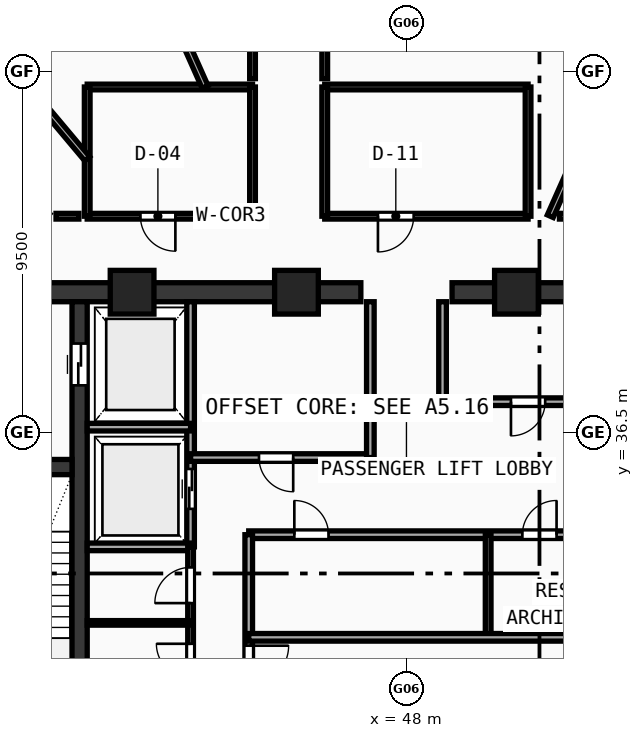
"""IFC4 building model, lengths in metres.
Left out: names, types, materials, properties, quantities, classifications, styles, units other than length and angle.
Written with IfcOpenShell. Run it as: python <this file> out.ifc"""

import sys

from ifc_helpers import new_model, si_unit, direction, frame, frame_2d, origin, origin_with_axes, origin_2d, place, context, subcontext, project, spatial, rectangle, hollow_rectangle, extrude, source, transform, mapped, element, fill, save


model = new_model("IFC4")
c1 = context("Model", 3, precision=1e-05, world=origin(), true_north=direction((0.0, 1.0)))
c2 = subcontext(c1, "Body", "Model", "MODEL_VIEW")
j1 = project(units=[si_unit("LENGTHUNIT", "METRE"), si_unit("PLANEANGLEUNIT", "RADIAN")], contexts=[c1])
p1 = place(None, origin())
s1 = spatial("IfcSite", under=j1, at=p1, CompositionType="ELEMENT")
p2 = place(p1, origin())
s2 = spatial("IfcBuilding", under=s1, at=p2, CompositionType="ELEMENT")
p3 = place(p2, frame((0.0, 0.0, 233.34)))
s3 = spatial("IfcBuildingStorey", under=s2, at=p3, CompositionType="ELEMENT", Elevation=233.34)
p4 = place(p3, frame((35.55, 40.2, 0.0), z_axis=(0.0, 0.0, 1.0), x_axis=(1.0, 0.0, 0.0)))
e1 = element("IfcWall", 1, at=p4, inside=s3, PredefinedType="SHEAR", context=c2, shape_type="SweptSolid", body=[
    extrude(rectangle(XDim=11.25, YDim=0.5, at=frame_2d((5.625, 0.0))), origin(), (0.0, 0.0, 1.0), 3.47),
])
p5 = place(p4, frame((1.6, 0.0, 0.0)))
e2 = element("IfcOpeningElement", 2, at=p5, cuts=e1, PredefinedType="OPENING", context=c2, shape_type="SweptSolid", body=[
    extrude(rectangle(XDim=1.05, YDim=2.1, at=frame_2d((0.525, 1.05))), frame((0.0, 0.26, 0.0), z_axis=(0.0, -1.0, 0.0), x_axis=(1.0, 0.0, 0.0)), (0.0, 0.0, 1.0), 0.52),
])
p6 = place(p3, frame((49.2, 40.2, 0.0), z_axis=(0.0, 0.0, 1.0), x_axis=(1.0, 0.0, 0.0)))
e3 = element("IfcWall", 3, at=p6, inside=s3, PredefinedType="SHEAR", context=c2, shape_type="SweptSolid", body=[
    extrude(rectangle(XDim=11.25, YDim=0.5, at=frame_2d((5.625, 0.0))), origin(), (0.0, 0.0, 1.0), 3.47),
])
p7 = place(p6, frame((8.6, 0.0, 0.0)))
e4 = element("IfcOpeningElement", 4, at=p7, cuts=e3, PredefinedType="OPENING", context=c2, shape_type="SweptSolid", body=[
    extrude(rectangle(XDim=1.05, YDim=2.1, at=frame_2d((0.525, 1.05))), frame((0.0, 0.26, 0.0), z_axis=(0.0, -1.0, 0.0), x_axis=(1.0, 0.0, 0.0)), (0.0, 0.0, 1.0), 0.52),
])
p8 = place(p3, frame((39.4, 27.75, 0.0), z_axis=(0.0, 0.0, 1.0), x_axis=(0.0, 1.0, 0.0)))
e5 = element("IfcWall", 5, at=p8, inside=s3, PredefinedType="SHEAR", context=c2, shape_type="SweptSolid", body=[
    extrude(rectangle(XDim=12.2, YDim=0.4, at=frame_2d((6.1, 0.0))), origin(), (0.0, 0.0, 1.0), 3.47),
])
p9 = place(p8, frame((10.0, 0.0, 0.0)))
e6 = element("IfcOpeningElement", 6, at=p9, cuts=e5, PredefinedType="OPENING", context=c2, shape_type="SweptSolid", body=[
    extrude(rectangle(XDim=1.1, YDim=2.1, at=frame_2d((0.55, 1.05))), frame((0.0, 0.21, 0.0), z_axis=(0.0, -1.0, 0.0), x_axis=(1.0, 0.0, 0.0)), (0.0, 0.0, 1.0), 0.42),
])
p10 = place(p3, frame((36.05, 35.6, 0.0), z_axis=(0.0, 0.0, 1.0), x_axis=(1.0, 0.0, 0.0)))
e7 = element("IfcWall", 7, at=p10, inside=s3, PredefinedType="SHEAR", context=c2, shape_type="SweptSolid", body=[
    extrude(rectangle(XDim=3.15, YDim=0.4, at=frame_2d((1.575, 0.0))), origin(), (0.0, 0.0, 1.0), 3.47),
])
p11 = place(p10, frame((1.07, 0.0, 0.0)))
e8 = element("IfcOpeningElement", 8, at=p11, cuts=e7, PredefinedType="OPENING", context=c2, shape_type="SweptSolid", body=[
    extrude(rectangle(XDim=1.05, YDim=2.1, at=frame_2d((0.525, 1.05))), frame((0.0, 0.21, 0.0), z_axis=(0.0, -1.0, 0.0), x_axis=(1.0, 0.0, 0.0)), (0.0, 0.0, 1.0), 0.42),
])
m1 = source(origin(), c2, "Body", "SweptSolid", [
    extrude(hollow_rectangle(XDim=1.15, YDim=1.15, WallThickness=0.048, at=origin_2d()), origin(), (0.0, 0.0, 1.0), 3.73),
])
for number, where, z_axis, x_axis in (
    (9, (50.894, 40.2, -0.26), (0.0, 0.0, 1.0), (1.0, 0.0, 0.0)),
    (10, (45.106, 40.2, -0.26), (0.0, 0.0, 1.0), (1.0, 0.0, 0.0)),
    (11, (40.781, 40.2, -0.26), (0.0, 0.0, 1.0), (1.0, 0.0, 0.0)),
):
    element("IfcColumn", number, at=place(p3, frame(where, z_axis=z_axis, x_axis=x_axis)), inside=s3, PredefinedType="COLUMN", context=c2, shape_type="MappedRepresentation", body=[
        mapped(m1, transform((0.0, 0.0, 0.0), scale=1.0)),
    ])
p12 = place(p3, frame((42.32, 33.5, 0.0), z_axis=(0.0, 0.0, 1.0), x_axis=(0.0, 1.0, 0.0)))
e12 = element("IfcWall", 12, at=p12, inside=s3, PredefinedType="SOLIDWALL", context=c2, shape_type="SweptSolid", body=[
    extrude(rectangle(XDim=6.45, YDim=0.2, at=frame_2d((3.225, 0.0))), origin(), (0.0, 0.0, 1.0), 3.47),
])
p13 = place(p12, frame((1.0, 0.0, 0.0)))
e13 = element("IfcOpeningElement", 13, at=p13, cuts=e12, PredefinedType="OPENING", context=c2, shape_type="SweptSolid", body=[
    extrude(rectangle(XDim=1.05, YDim=2.1, at=frame_2d((0.525, 1.05))), frame((0.0, 0.11, 0.0), z_axis=(0.0, -1.0, 0.0), x_axis=(1.0, 0.0, 0.0)), (0.0, 0.0, 1.0), 0.22),
])
for number, where, z_axis, x_axis in (
    (14, (39.6, 36.65, 0.0), (0.0, 0.0, 1.0), (1.0, 0.0, 0.0)),
    (15, (39.6, 33.5, 0.0), (0.0, 0.0, 1.0), (1.0, 0.0, 0.0)),
):
    element("IfcWall", number, at=place(p3, frame(where, z_axis=z_axis, x_axis=x_axis)), inside=s3, PredefinedType="SOLIDWALL", context=c2, shape_type="SweptSolid", body=[
        extrude(rectangle(XDim=2.72, YDim=0.2, at=frame_2d((1.36, 0.0))), origin(), (0.0, 0.0, 1.0), 3.47),
    ])
p14 = place(p3, frame((42.32, 35.85, 0.0), z_axis=(0.0, 0.0, 1.0), x_axis=(1.0, 0.0, 0.0)))
e16 = element("IfcWall", 16, at=p14, inside=s3, PredefinedType="SOLIDWALL", context=c2, shape_type="SweptSolid", body=[
    extrude(rectangle(XDim=4.73, YDim=0.2, at=frame_2d((2.365, 0.0))), origin(), (0.0, 0.0, 1.0), 3.47),
])
p15 = place(p14, frame((1.8, 0.0, 0.0)))
e17 = element("IfcOpeningElement", 17, at=p15, cuts=e16, PredefinedType="OPENING", context=c2, shape_type="SweptSolid", body=[
    extrude(rectangle(XDim=0.9, YDim=2.1, at=frame_2d((0.45, 1.05))), frame((0.0, 0.11, 0.0), z_axis=(0.0, -1.0, 0.0), x_axis=(1.0, 0.0, 0.0)), (0.0, 0.0, 1.0), 0.22),
])
p16 = place(p3, frame((48.95, 37.32, 0.0), z_axis=(0.0, 0.0, 1.0), x_axis=(1.0, 0.0, 0.0)))
e18 = element("IfcWall", 18, at=p16, inside=s3, PredefinedType="SOLIDWALL", context=c2, shape_type="SweptSolid", body=[
    extrude(rectangle(XDim=4.73, YDim=0.2, at=frame_2d((2.365, 0.0))), origin(), (0.0, 0.0, 1.0), 3.47),
])
p17 = place(p16, frame((1.8, 0.0, 0.0)))
e19 = element("IfcOpeningElement", 19, at=p17, cuts=e18, PredefinedType="OPENING", context=c2, shape_type="SweptSolid", body=[
    extrude(rectangle(XDim=0.9, YDim=2.1, at=frame_2d((0.45, 1.05))), frame((0.0, 0.11, 0.0), z_axis=(0.0, -1.0, 0.0), x_axis=(1.0, 0.0, 0.0)), (0.0, 0.0, 1.0), 0.22),
])
p18 = place(p3, frame((47.05, 35.85, 0.0), z_axis=(0.0, 0.0, 1.0), x_axis=(0.0, 1.0, 0.0)))
e20 = element("IfcWall", 20, at=p18, inside=s3, PredefinedType="SOLIDWALL", context=c2, shape_type="SweptSolid", body=[
    extrude(rectangle(XDim=4.1, YDim=0.2, at=frame_2d((2.05, 0.0))), origin(), (0.0, 0.0, 1.0), 3.47),
])
p19 = place(p3, frame((48.95, 37.32, 0.0), z_axis=(0.0, 0.0, 1.0), x_axis=(0.0, 1.0, 0.0)))
e21 = element("IfcWall", 21, at=p19, inside=s3, PredefinedType="SOLIDWALL", context=c2, shape_type="SweptSolid", body=[
    extrude(rectangle(XDim=2.63, YDim=0.2, at=frame_2d((1.315, 0.0))), origin(), (0.0, 0.0, 1.0), 3.47),
])
p20 = place(p3, frame((43.85, 33.82, 0.0), z_axis=(0.0, 0.0, 1.0), x_axis=(1.0, 0.0, 0.0)))
e22 = element("IfcWall", 22, at=p20, inside=s3, PredefinedType="SOLIDWALL", context=c2, shape_type="SweptSolid", body=[
    extrude(rectangle(XDim=9.83, YDim=0.2, at=frame_2d((4.915, 0.0))), origin(), (0.0, 0.0, 1.0), 3.47),
])
p21 = place(p20, frame((1.2, 0.0, 0.0)))
e23 = element("IfcOpeningElement", 23, at=p21, cuts=e22, PredefinedType="OPENING", context=c2, shape_type="SweptSolid", body=[
    extrude(rectangle(XDim=0.9, YDim=2.1, at=frame_2d((0.45, 1.05))), frame((0.0, 0.11, 0.0), z_axis=(0.0, -1.0, 0.0), x_axis=(1.0, 0.0, 0.0)), (0.0, 0.0, 1.0), 0.22),
])
p22 = place(p20, frame((7.2, 0.0, 0.0)))
e24 = element("IfcOpeningElement", 24, at=p22, cuts=e22, PredefinedType="OPENING", context=c2, shape_type="SweptSolid", body=[
    extrude(rectangle(XDim=0.9, YDim=2.1, at=frame_2d((0.45, 1.05))), frame((0.0, 0.11, 0.0), z_axis=(0.0, -1.0, 0.0), x_axis=(1.0, 0.0, 0.0)), (0.0, 0.0, 1.0), 0.22),
])
p23 = place(p3, frame((43.85, 27.6, 0.0), z_axis=(0.0, 0.0, 1.0), x_axis=(0.0, 1.0, 0.0)))
e25 = element("IfcWall", 25, at=p23, inside=s3, PredefinedType="SOLIDWALL", context=c2, shape_type="SweptSolid", body=[
    extrude(rectangle(XDim=6.22, YDim=0.2, at=frame_2d((3.11, 0.0))), origin(), (0.0, 0.0, 1.0), 3.47),
])
p24 = place(p23, frame((2.25, 0.0, 0.0)))
e26 = element("IfcOpeningElement", 26, at=p24, cuts=e25, PredefinedType="OPENING", context=c2, shape_type="SweptSolid", body=[
    extrude(rectangle(XDim=1.05, YDim=2.1, at=frame_2d((0.525, 1.05))), frame((0.0, 0.11, 0.0), z_axis=(0.0, -1.0, 0.0), x_axis=(1.0, 0.0, 0.0)), (0.0, 0.0, 1.0), 0.22),
])
p25 = place(p3, frame((50.15, 31.12, 0.0), z_axis=(0.0, 0.0, 1.0), x_axis=(0.0, 1.0, 0.0)))
e27 = element("IfcWall", 27, at=p25, inside=s3, PredefinedType="PARTITIONING", context=c2, shape_type="SweptSolid", body=[
    extrude(rectangle(XDim=2.7, YDim=0.15, at=frame_2d((1.35, 0.0))), origin(), (0.0, 0.0, 1.0), 3.47),
])
p26 = place(p3, frame((43.85, 31.12, 0.0), z_axis=(0.0, 0.0, 1.0), x_axis=(1.0, 0.0, 0.0)))
e28 = element("IfcWall", 28, at=p26, inside=s3, PredefinedType="SOLIDWALL", context=c2, shape_type="SweptSolid", body=[
    extrude(rectangle(XDim=9.83, YDim=0.2, at=frame_2d((4.915, 0.0))), origin(), (0.0, 0.0, 1.0), 3.47),
])
p27 = place(p3, frame((42.32, 27.6, 0.0), z_axis=(0.0, 0.0, 1.0), x_axis=(0.0, 1.0, 0.0)))
e29 = element("IfcWall", 29, at=p27, inside=s3, PredefinedType="PARTITIONING", context=c2, shape_type="SweptSolid", body=[
    extrude(rectangle(XDim=5.9, YDim=0.15, at=frame_2d((2.95, 0.0))), origin(), (0.0, 0.0, 1.0), 3.47),
])
p28 = place(p27, frame((0.5, 0.0, 0.0)))
e30 = element("IfcOpeningElement", 30, at=p28, cuts=e29, PredefinedType="OPENING", context=c2, shape_type="SweptSolid", body=[
    extrude(rectangle(XDim=0.9, YDim=2.1, at=frame_2d((0.45, 1.05))), frame((0.0, 0.085, 0.0), z_axis=(0.0, -1.0, 0.0), x_axis=(1.0, 0.0, 0.0)), (0.0, 0.0, 1.0), 0.17),
])
p29 = place(p27, frame((2.45, 0.0, 0.0)))
e31 = element("IfcOpeningElement", 31, at=p29, cuts=e29, PredefinedType="OPENING", context=c2, shape_type="SweptSolid", body=[
    extrude(rectangle(XDim=0.9, YDim=2.1, at=frame_2d((0.45, 1.05))), frame((0.0, 0.085, 0.0), z_axis=(0.0, -1.0, 0.0), x_axis=(1.0, 0.0, 0.0)), (0.0, 0.0, 1.0), 0.17),
])
p30 = place(p27, frame((4.42, 0.0, 0.0)))
e32 = element("IfcOpeningElement", 32, at=p30, cuts=e29, PredefinedType="OPENING", context=c2, shape_type="SweptSolid", body=[
    extrude(rectangle(XDim=0.94, YDim=2.1, at=frame_2d((0.47, 1.05))), frame((0.0, 0.085, 0.0), z_axis=(0.0, -1.0, 0.0), x_axis=(1.0, 0.0, 0.0)), (0.0, 0.0, 1.0), 0.17),
])
p31 = place(p3, frame((39.6, 31.5, 0.0), z_axis=(0.0, 0.0, 1.0), x_axis=(1.0, 0.0, 0.0)))
e33 = element("IfcWall", 33, at=p31, inside=s3, PredefinedType="PARTITIONING", context=c2, shape_type="SweptSolid", body=[
    extrude(rectangle(XDim=2.72, YDim=0.12, at=frame_2d((1.36, 0.0))), origin(), (0.0, 0.0, 1.0), 3.47),
])
p32 = place(p3, frame((39.6, 42.2, 0.0), z_axis=(0.0, 0.0, 1.0), x_axis=(1.0, 0.0, 0.0)))
e34 = element("IfcWall", 34, at=p32, inside=s3, PredefinedType="PARTITIONING", context=c2, shape_type="SweptSolid", body=[
    extrude(rectangle(XDim=4.35, YDim=0.15, at=frame_2d((2.175, 0.0))), origin(), (0.0, 0.0, 1.0), 3.47),
])
p33 = place(p32, frame((1.4, 0.0, 0.0)))
e35 = element("IfcOpeningElement", 35, at=p33, cuts=e34, PredefinedType="OPENING", context=c2, shape_type="SweptSolid", body=[
    extrude(rectangle(XDim=0.92, YDim=2.1, at=frame_2d((0.46, 1.05))), frame((0.0, 0.085, 0.0), z_axis=(0.0, -1.0, 0.0), x_axis=(1.0, 0.0, 0.0)), (0.0, 0.0, 1.0), 0.17),
])
p34 = place(p3, frame((39.6, 45.6, 0.0), z_axis=(0.0, 0.0, 1.0), x_axis=(1.0, 0.0, 0.0)))
e36 = element("IfcWall", 36, at=p34, inside=s3, PredefinedType="PARTITIONING", context=c2, shape_type="SweptSolid", body=[
    extrude(rectangle(XDim=4.35, YDim=0.15, at=frame_2d((2.175, 0.0))), origin(), (0.0, 0.0, 1.0), 2.82),
])
p35 = place(p3, frame((39.6, 42.2, 0.0), z_axis=(0.0, 0.0, 1.0), x_axis=(0.0, 1.0, 0.0)))
e37 = element("IfcWall", 37, at=p35, inside=s3, PredefinedType="PARTITIONING", context=c2, shape_type="SweptSolid", body=[
    extrude(rectangle(XDim=3.4, YDim=0.15, at=frame_2d((1.7, 0.0))), origin(), (0.0, 0.0, 1.0), 3.47),
])
p36 = place(p3, frame((43.95, 42.2, 0.0), z_axis=(0.0, 0.0, 1.0), x_axis=(0.0, 1.0, 0.0)))
e38 = element("IfcWall", 38, at=p36, inside=s3, PredefinedType="PARTITIONING", context=c2, shape_type="SweptSolid", body=[
    extrude(rectangle(XDim=3.4, YDim=0.15, at=frame_2d((1.7, 0.0))), origin(), (0.0, 0.0, 1.0), 2.82),
])
p37 = place(p3, frame((45.85, 42.2, 0.0), z_axis=(0.0, 0.0, 1.0), x_axis=(1.0, 0.0, 0.0)))
e39 = element("IfcWall", 39, at=p37, inside=s3, PredefinedType="PARTITIONING", context=c2, shape_type="SweptSolid", body=[
    extrude(rectangle(XDim=5.35, YDim=0.15, at=frame_2d((2.675, 0.0))), origin(), (0.0, 0.0, 1.0), 3.47),
])
p38 = place(p37, frame((1.4, 0.0, 0.0)))
e40 = element("IfcOpeningElement", 40, at=p38, cuts=e39, PredefinedType="OPENING", context=c2, shape_type="SweptSolid", body=[
    extrude(rectangle(XDim=0.94, YDim=2.1, at=frame_2d((0.47, 1.05))), frame((0.0, 0.085, 0.0), z_axis=(0.0, -1.0, 0.0), x_axis=(1.0, 0.0, 0.0)), (0.0, 0.0, 1.0), 0.17),
])
p39 = place(p3, frame((45.85, 45.6, 0.0), z_axis=(0.0, 0.0, 1.0), x_axis=(1.0, 0.0, 0.0)))
e41 = element("IfcWall", 41, at=p39, inside=s3, PredefinedType="PARTITIONING", context=c2, shape_type="SweptSolid", body=[
    extrude(rectangle(XDim=5.35, YDim=0.15, at=frame_2d((2.675, 0.0))), origin(), (0.0, 0.0, 1.0), 3.47),
])
for number, where, z_axis, x_axis in (
    (42, (45.85, 42.2, 0.0), (0.0, 0.0, 1.0), (0.0, 1.0, 0.0)),
    (43, (51.2, 42.2, 0.0), (0.0, 0.0, 1.0), (0.0, 1.0, 0.0)),
):
    element("IfcWall", number, at=place(p3, frame(where, z_axis=z_axis, x_axis=x_axis)), inside=s3, PredefinedType="PARTITIONING", context=c2, shape_type="SweptSolid", body=[
        extrude(rectangle(XDim=3.4, YDim=0.15, at=frame_2d((1.7, 0.0))), origin(), (0.0, 0.0, 1.0), 3.47),
    ])
p40 = place(p3, frame((51.784, 42.2, 0.0), z_axis=(0.0, 0.0, 1.0), x_axis=(0.406737084028, 0.913545261318, 0.0)))
e44 = element("IfcWall", 44, at=p40, inside=s3, PredefinedType="PARTITIONING", context=c2, shape_type="SweptSolid", body=[
    extrude(rectangle(XDim=27.09, YDim=0.17, at=frame_2d((13.545, 0.0))), origin(), (0.0, 0.0, 1.0), 2.82),
])
p41 = place(p3, frame((42.702, 45.6, 0.0), z_axis=(0.0, 0.0, 1.0), x_axis=(-0.406743256781, 0.913542513003, 0.0)))
e45 = element("IfcWall", 45, at=p41, inside=s3, PredefinedType="PARTITIONING", context=c2, shape_type="SweptSolid", body=[
    extrude(rectangle(XDim=23.368, YDim=0.17, at=frame_2d((11.684, 0.0))), origin(), (0.0, 0.0, 1.0), 2.82),
])
p42 = place(p3, frame((39.6, 43.711, 0.0), z_axis=(0.0, 0.0, 1.0), x_axis=(-0.642791950905, 0.766040800383, 0.0)))
e46 = element("IfcWall", 46, at=p42, inside=s3, PredefinedType="PARTITIONING", context=c2, shape_type="SweptSolid", body=[
    extrude(rectangle(XDim=18.806, YDim=0.17, at=frame_2d((9.403, 0.0))), origin(), (0.0, 0.0, 1.0), 2.82),
])
p43 = place(p3, frame((38.78, 42.2, 0.0), z_axis=(0.0, 0.0, 1.0), x_axis=(1.0, 0.0, 0.0)))
e47 = element("IfcWall", 47, at=p43, inside=s3, PredefinedType="PARTITIONING", context=c2, shape_type="SweptSolid", body=[
    extrude(rectangle(XDim=0.6, YDim=0.15, at=frame_2d((0.3, 0.0))), origin(), (0.0, 0.0, 1.0), 2.82),
])
p44 = place(p3, frame((43.95, 45.82, 0.0), z_axis=(0.0, 0.0, 1.0), x_axis=(0.0, 1.0, 0.0)))
e48 = element("IfcWall", 48, at=p44, inside=s3, PredefinedType="PARTITIONING", context=c2, shape_type="SweptSolid", body=[
    extrude(rectangle(XDim=9.96, YDim=0.15, at=frame_2d((4.98, 0.0))), origin(), (0.0, 0.0, 1.0), 3.12),
])
p45 = place(p44, frame((4.395, 0.0, 0.0)))
e49 = element("IfcOpeningElement", 49, at=p45, cuts=e48, PredefinedType="OPENING", context=c2, shape_type="SweptSolid", body=[
    extrude(rectangle(XDim=0.98, YDim=2.12, at=frame_2d((0.49, 1.06))), frame((0.0, 0.085, 0.0), z_axis=(0.0, -1.0, 0.0), x_axis=(1.0, 0.0, 0.0)), (0.0, 0.0, 1.0), 0.17),
])
p46 = place(p3, frame((45.85, 55.78, 0.0), z_axis=(0.0, 0.0, 1.0), x_axis=(0.0, -1.0, 0.0)))
e50 = element("IfcWall", 50, at=p46, inside=s3, PredefinedType="PARTITIONING", context=c2, shape_type="SweptSolid", body=[
    extrude(rectangle(XDim=9.96, YDim=0.15, at=frame_2d((4.98, 0.0))), origin(), (0.0, 0.0, 1.0), 3.12),
])
p47 = place(p3, frame((52.025, 42.2, 0.0), z_axis=(0.0, 0.0, 1.0), x_axis=(1.0, 0.0, 0.0)))
e51 = element("IfcWall", 51, at=p47, inside=s3, PredefinedType="PARTITIONING", context=c2, shape_type="SweptSolid", body=[
    extrude(rectangle(XDim=5.195, YDim=0.15, at=frame_2d((2.598, 0.0))), origin(), (0.0, 0.0, 1.0), 2.82),
])
p48 = place(p47, frame((2.112, 0.0, 0.0)))
e52 = element("IfcOpeningElement", 52, at=p48, cuts=e51, PredefinedType="OPENING", context=c2, shape_type="SweptSolid", body=[
    extrude(rectangle(XDim=0.98, YDim=2.12, at=frame_2d((0.49, 1.06))), frame((0.0, 0.085, 0.0), z_axis=(0.0, -1.0, 0.0), x_axis=(1.0, 0.0, 0.0)), (0.0, 0.0, 1.0), 0.17),
])
m2 = source(origin(), c2, "Body", "SweptSolid", [
    extrude(rectangle(XDim=1.1, YDim=2.1, at=frame_2d((0.55, 1.05))), frame((0.0, 0.025, 0.0), z_axis=(0.0, -1.0, 0.0), x_axis=(1.0, 0.0, 0.0)), (0.0, 0.0, 1.0), 0.05),
])
p49 = place(p9, frame((1.1, 0.0, 0.0), z_axis=(0.0, 0.0, 1.0), x_axis=(-1.0, 0.0, 0.0)))
e53 = element("IfcDoor", 53, at=p49, inside=s3, OperationType="DOUBLE_DOOR_SLIDING", PredefinedType="DOOR", context=c2, shape_type="MappedRepresentation", body=[
    mapped(m2, transform((0.0, 0.0, 0.0), scale=1.0)),
])
fill(e6, e53)
m3 = source(origin(), c2, "Body", "SweptSolid", [
    extrude(rectangle(XDim=1.05, YDim=2.1, at=frame_2d((0.525, 1.05))), frame((0.0, 0.025, 0.0), z_axis=(0.0, -1.0, 0.0), x_axis=(1.0, 0.0, 0.0)), (0.0, 0.0, 1.0), 0.05),
])
p50 = place(p13, origin_with_axes())
e54 = element("IfcDoor", 54, at=p50, inside=s3, OperationType="DOUBLE_DOOR_SLIDING", PredefinedType="DOOR", context=c2, shape_type="MappedRepresentation", body=[
    mapped(m3, transform((0.0, 0.0, 0.0), scale=1.0)),
])
fill(e13, e54)
m4 = source(origin(), c2, "Body", "SweptSolid", [
    extrude(rectangle(XDim=0.9, YDim=2.1, at=frame_2d((0.45, 1.05))), frame((0.0, 0.025, 0.0), z_axis=(0.0, -1.0, 0.0), x_axis=(1.0, 0.0, 0.0)), (0.0, 0.0, 1.0), 0.05),
])
p51 = place(p15, frame((0.9, 0.0, 0.0), z_axis=(0.0, 0.0, 1.0), x_axis=(-1.0, 0.0, 0.0)))
e55 = element("IfcDoor", 55, at=p51, inside=s3, OperationType="SINGLE_SWING_LEFT", PredefinedType="DOOR", context=c2, shape_type="MappedRepresentation", body=[
    mapped(m4, transform((0.0, 0.0, 0.0), scale=1.0)),
])
fill(e17, e55)
p52 = place(p17, frame((0.9, 0.0, 0.0), z_axis=(0.0, 0.0, 1.0), x_axis=(-1.0, 0.0, 0.0)))
e56 = element("IfcDoor", 56, at=p52, inside=s3, OperationType="SINGLE_SWING_RIGHT", PredefinedType="DOOR", context=c2, shape_type="MappedRepresentation", body=[
    mapped(m4, transform((0.0, 0.0, 0.0), scale=1.0)),
])
fill(e19, e56)
p53 = place(p21, origin_with_axes())
e57 = element("IfcDoor", 57, at=p53, inside=s3, OperationType="SINGLE_SWING_LEFT", PredefinedType="DOOR", context=c2, shape_type="MappedRepresentation", body=[
    mapped(m4, transform((0.0, 0.0, 0.0), scale=1.0)),
])
fill(e23, e57)
p54 = place(p22, origin_with_axes())
e58 = element("IfcDoor", 58, at=p54, inside=s3, OperationType="SINGLE_SWING_RIGHT", PredefinedType="DOOR", context=c2, shape_type="MappedRepresentation", body=[
    mapped(m4, transform((0.0, 0.0, 0.0), scale=1.0)),
])
fill(e24, e58)
p55 = place(p24, frame((1.05, 0.0, 0.0), z_axis=(0.0, 0.0, 1.0), x_axis=(-1.0, 0.0, 0.0)))
e59 = element("IfcDoor", 59, at=p55, inside=s3, OperationType="SINGLE_SWING_LEFT", PredefinedType="DOOR", context=c2, shape_type="MappedRepresentation", body=[
    mapped(m3, transform((0.0, 0.0, 0.0), scale=1.0)),
])
fill(e26, e59)
p56 = place(p29, origin_with_axes())
e60 = element("IfcDoor", 60, at=p56, inside=s3, OperationType="SINGLE_SWING_RIGHT", PredefinedType="DOOR", context=c2, shape_type="MappedRepresentation", body=[
    mapped(m4, transform((0.0, 0.0, 0.0), scale=1.0)),
])
fill(e31, e60)
m5 = source(origin(), c2, "Body", "SweptSolid", [
    extrude(rectangle(XDim=0.94, YDim=2.1, at=frame_2d((0.47, 1.05))), frame((0.0, 0.025, 0.0), z_axis=(0.0, -1.0, 0.0), x_axis=(1.0, 0.0, 0.0)), (0.0, 0.0, 1.0), 0.05),
])
p57 = place(p30, origin_with_axes())
e61 = element("IfcDoor", 61, at=p57, inside=s3, OperationType="SINGLE_SWING_LEFT", PredefinedType="DOOR", context=c2, shape_type="MappedRepresentation", body=[
    mapped(m5, transform((0.0, 0.0, 0.0), scale=1.0)),
])
fill(e32, e61)
m6 = source(origin(), c2, "Body", "SweptSolid", [
    extrude(rectangle(XDim=0.92, YDim=2.1, at=frame_2d((0.46, 1.05))), frame((0.0, 0.025, 0.0), z_axis=(0.0, -1.0, 0.0), x_axis=(1.0, 0.0, 0.0)), (0.0, 0.0, 1.0), 0.05),
])
p58 = place(p33, frame((0.92, 0.0, 0.0), z_axis=(0.0, 0.0, 1.0), x_axis=(-1.0, 0.0, 0.0)))
e62 = element("IfcDoor", 62, at=p58, inside=s3, OperationType="SINGLE_SWING_LEFT", PredefinedType="DOOR", context=c2, shape_type="MappedRepresentation", body=[
    mapped(m6, transform((0.0, 0.0, 0.0), scale=1.0)),
])
fill(e35, e62)
p59 = place(p38, frame((0.94, 0.0, 0.0), z_axis=(0.0, 0.0, 1.0), x_axis=(-1.0, 0.0, 0.0)))
e63 = element("IfcDoor", 63, at=p59, inside=s3, OperationType="SINGLE_SWING_RIGHT", PredefinedType="DOOR", context=c2, shape_type="MappedRepresentation", body=[
    mapped(m5, transform((0.0, 0.0, 0.0), scale=1.0)),
])
fill(e40, e63)
save(model, sys.argv[1])
